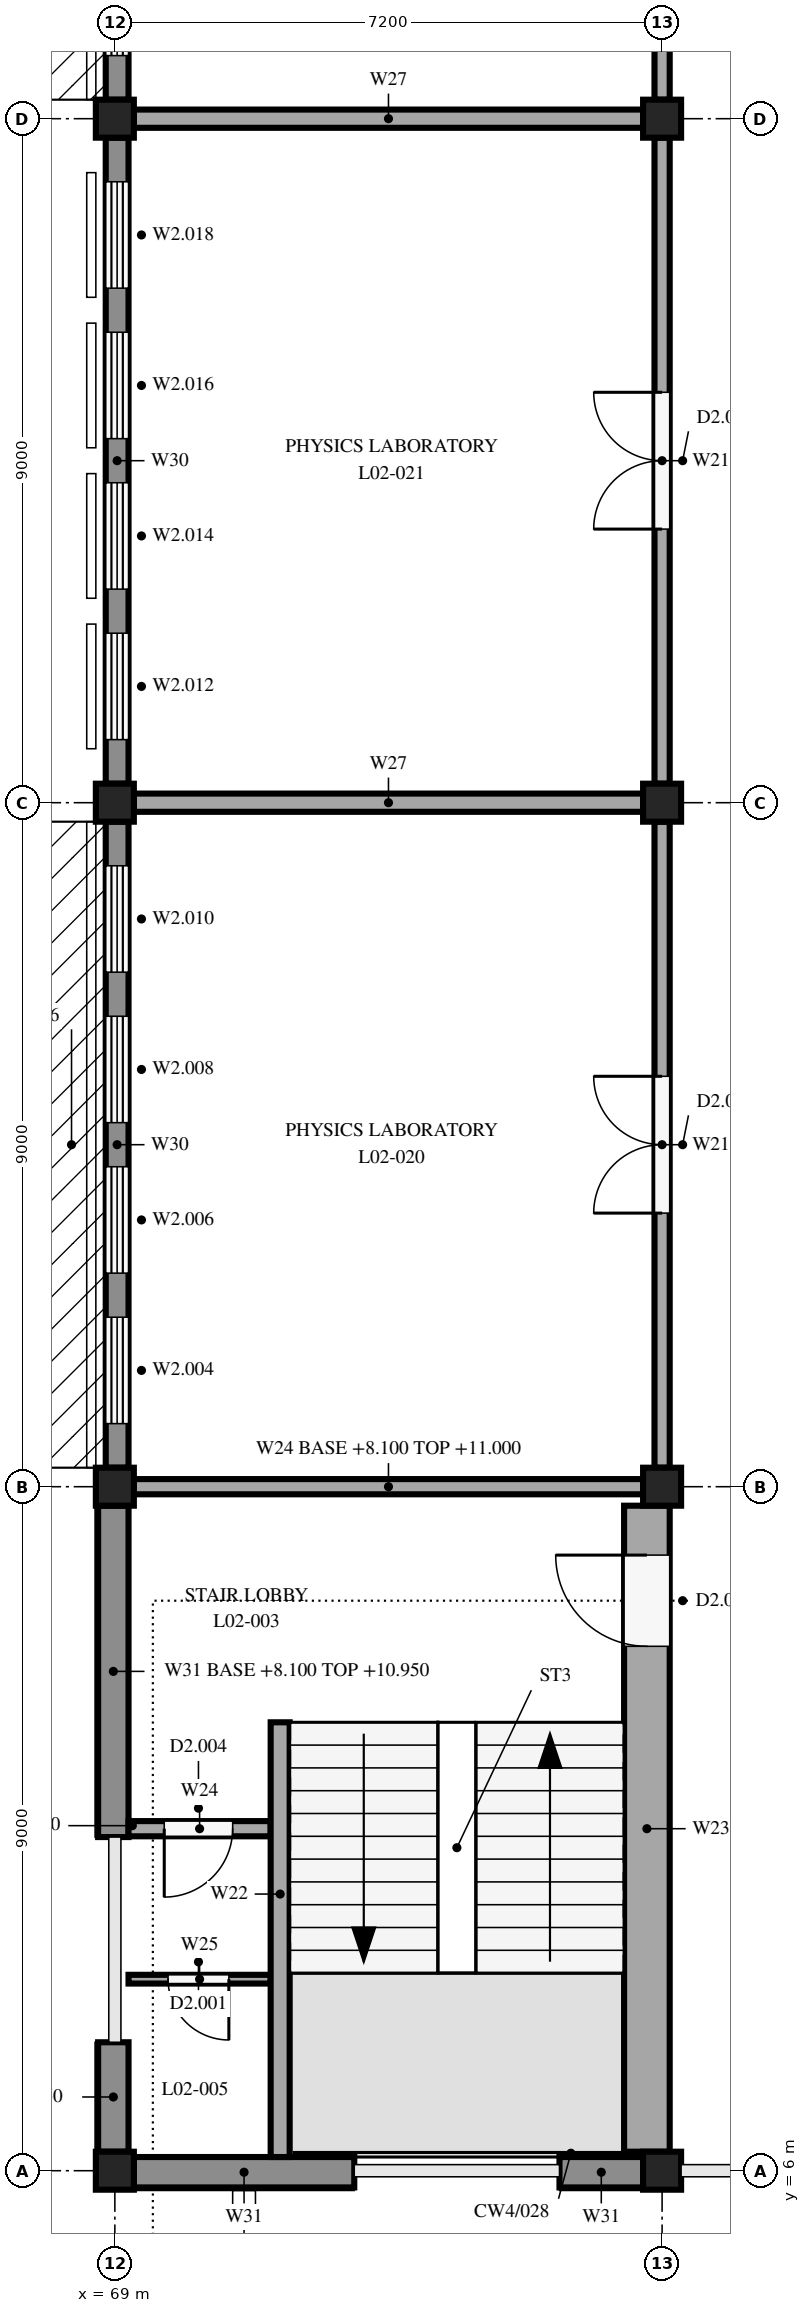
"""IFC4 building model, lengths in metres.
Left out: names, types, materials, properties, quantities, classifications, styles, units other than length and angle.
Written with IfcOpenShell. Run it as: python <this file> out.ifc"""

import sys

from ifc_helpers import new_model, si_unit, direction, frame, frame_2d, origin, origin_2d, place, context, subcontext, project, spatial, rectangle, extrude, element, fill, save


model = new_model("IFC4")
c1 = context("Model", 3, precision=1e-05, world=origin(), true_north=direction((0.0, 1.0)))
c2 = subcontext(c1, "Body", "Model", "MODEL_VIEW")
j1 = project(units=[si_unit("LENGTHUNIT", "METRE"), si_unit("PLANEANGLEUNIT", "RADIAN")], contexts=[c1])
p1 = place(None, origin())
s1 = spatial("IfcSite", under=j1, at=p1, CompositionType="ELEMENT")
p2 = place(p1, origin())
s2 = spatial("IfcBuilding", under=s1, at=p2, CompositionType="ELEMENT")
p3 = place(p2, frame((0.0, 0.0, 8.1)))
s3 = spatial("IfcBuildingStorey", under=s2, at=p3, CompositionType="ELEMENT", Elevation=8.1)
for number, where, z_axis, x_axis in (
    (1, (69.0, 6.0, 0.0), (0.0, 0.0, 1.0), (1.0, 0.0, 0.0)),
    (2, (69.0, 15.0, 0.0), (0.0, 0.0, 1.0), (1.0, 0.0, 0.0)),
    (3, (69.0, 24.0, 0.0), (0.0, 0.0, 1.0), (1.0, 0.0, 0.0)),
    (4, (69.0, 33.0, 0.0), (0.0, 0.0, 1.0), (1.0, 0.0, 0.0)),
    (5, (76.2, 6.0, 0.0), (0.0, 0.0, 1.0), (1.0, 0.0, 0.0)),
    (6, (76.2, 15.0, 0.0), (0.0, 0.0, 1.0), (1.0, 0.0, 0.0)),
    (7, (76.2, 24.0, 0.0), (0.0, 0.0, 1.0), (1.0, 0.0, 0.0)),
    (8, (76.2, 33.0, 0.0), (0.0, 0.0, 1.0), (1.0, 0.0, 0.0)),
):
    element("IfcColumn", number, at=place(p3, frame(where, z_axis=z_axis, x_axis=x_axis)), inside=s3, PredefinedType="COLUMN", context=c2, shape_type="SweptSolid", body=[
        extrude(rectangle(XDim=0.5, YDim=0.5, at=origin_2d()), origin(), (0.0, 0.0, 1.0), 3.35),
    ])
p4 = place(p3, frame((68.98, 6.25, 0.0), z_axis=(0.0, 0.0, 1.0), x_axis=(0.0, 1.0, 0.0)))
e9 = element("IfcWall", 9, at=p4, inside=s3, PredefinedType="STANDARD", context=c2, shape_type="SweptSolid", body=[
    extrude(rectangle(XDim=1.44, YDim=0.4, at=frame_2d((0.72, 0.0))), origin(), (0.0, 0.0, 1.0), 2.85),
])
p5 = place(p3, frame((68.98, 10.39, 0.0), z_axis=(0.0, 0.0, 1.0), x_axis=(0.0, 1.0, 0.0)))
e10 = element("IfcWall", 10, at=p5, inside=s3, PredefinedType="STANDARD", context=c2, shape_type="SweptSolid", body=[
    extrude(rectangle(XDim=4.36, YDim=0.4, at=frame_2d((2.18, 0.0))), origin(), (0.0, 0.0, 1.0), 2.85),
])
p6 = place(p3, frame((69.03, 15.25, 0.0), z_axis=(0.0, 0.0, 1.0), x_axis=(0.0, 1.0, 0.0)))
e11 = element("IfcWall", 11, at=p6, inside=s3, PredefinedType="STANDARD", context=c2, shape_type="SweptSolid", body=[
    extrude(rectangle(XDim=8.5, YDim=0.3, at=frame_2d((4.25, 0.0))), origin(), (0.0, 0.0, 1.0), 2.85),
])
p7 = place(p6, frame((0.58, 0.0, 0.9)))
e12 = element("IfcOpeningElement", 12, at=p7, cuts=e11, PredefinedType="OPENING", context=c2, shape_type="SweptSolid", body=[
    extrude(rectangle(XDim=1.4, YDim=1.9, at=frame_2d((0.7, 0.95))), frame((0.0, 0.16, 0.0), z_axis=(0.0, -1.0, 0.0), x_axis=(1.0, 0.0, 0.0)), (0.0, 0.0, 1.0), 0.32),
])
p8 = place(p6, frame((2.56, 0.0, 0.9)))
e13 = element("IfcOpeningElement", 13, at=p8, cuts=e11, PredefinedType="OPENING", context=c2, shape_type="SweptSolid", body=[
    extrude(rectangle(XDim=1.4, YDim=1.9, at=frame_2d((0.7, 0.95))), frame((0.0, 0.16, 0.0), z_axis=(0.0, -1.0, 0.0), x_axis=(1.0, 0.0, 0.0)), (0.0, 0.0, 1.0), 0.32),
])
p9 = place(p6, frame((4.54, 0.0, 0.9)))
e14 = element("IfcOpeningElement", 14, at=p9, cuts=e11, PredefinedType="OPENING", context=c2, shape_type="SweptSolid", body=[
    extrude(rectangle(XDim=1.4, YDim=1.9, at=frame_2d((0.7, 0.95))), frame((0.0, 0.16, 0.0), z_axis=(0.0, -1.0, 0.0), x_axis=(1.0, 0.0, 0.0)), (0.0, 0.0, 1.0), 0.32),
])
p10 = place(p6, frame((6.52, 0.0, 0.9)))
e15 = element("IfcOpeningElement", 15, at=p10, cuts=e11, PredefinedType="OPENING", context=c2, shape_type="SweptSolid", body=[
    extrude(rectangle(XDim=1.4, YDim=1.9, at=frame_2d((0.7, 0.95))), frame((0.0, 0.16, 0.0), z_axis=(0.0, -1.0, 0.0), x_axis=(1.0, 0.0, 0.0)), (0.0, 0.0, 1.0), 0.32),
])
p11 = place(p3, frame((69.03, 24.25, 0.0), z_axis=(0.0, 0.0, 1.0), x_axis=(0.0, 1.0, 0.0)))
e16 = element("IfcWall", 16, at=p11, inside=s3, PredefinedType="STANDARD", context=c2, shape_type="SweptSolid", body=[
    extrude(rectangle(XDim=8.5, YDim=0.3, at=frame_2d((4.25, 0.0))), origin(), (0.0, 0.0, 1.0), 2.85),
])
p12 = place(p11, frame((0.58, 0.0, 0.9)))
e17 = element("IfcOpeningElement", 17, at=p12, cuts=e16, PredefinedType="OPENING", context=c2, shape_type="SweptSolid", body=[
    extrude(rectangle(XDim=1.4, YDim=1.9, at=frame_2d((0.7, 0.95))), frame((0.0, 0.16, 0.0), z_axis=(0.0, -1.0, 0.0), x_axis=(1.0, 0.0, 0.0)), (0.0, 0.0, 1.0), 0.32),
])
p13 = place(p11, frame((2.56, 0.0, 0.9)))
e18 = element("IfcOpeningElement", 18, at=p13, cuts=e16, PredefinedType="OPENING", context=c2, shape_type="SweptSolid", body=[
    extrude(rectangle(XDim=1.4, YDim=1.9, at=frame_2d((0.7, 0.95))), frame((0.0, 0.16, 0.0), z_axis=(0.0, -1.0, 0.0), x_axis=(1.0, 0.0, 0.0)), (0.0, 0.0, 1.0), 0.32),
])
p14 = place(p11, frame((4.54, 0.0, 0.9)))
e19 = element("IfcOpeningElement", 19, at=p14, cuts=e16, PredefinedType="OPENING", context=c2, shape_type="SweptSolid", body=[
    extrude(rectangle(XDim=1.4, YDim=1.9, at=frame_2d((0.7, 0.95))), frame((0.0, 0.16, 0.0), z_axis=(0.0, -1.0, 0.0), x_axis=(1.0, 0.0, 0.0)), (0.0, 0.0, 1.0), 0.32),
])
p15 = place(p11, frame((6.52, 0.0, 0.9)))
e20 = element("IfcOpeningElement", 20, at=p15, cuts=e16, PredefinedType="OPENING", context=c2, shape_type="SweptSolid", body=[
    extrude(rectangle(XDim=1.4, YDim=1.9, at=frame_2d((0.7, 0.95))), frame((0.0, 0.16, 0.0), z_axis=(0.0, -1.0, 0.0), x_axis=(1.0, 0.0, 0.0)), (0.0, 0.0, 1.0), 0.32),
])
p16 = place(p3, frame((69.03, 33.25, 0.0), z_axis=(0.0, 0.0, 1.0), x_axis=(0.0, 1.0, 0.0)))
e21 = element("IfcWall", 21, at=p16, inside=s3, PredefinedType="STANDARD", context=c2, shape_type="SweptSolid", body=[
    extrude(rectangle(XDim=8.5, YDim=0.3, at=frame_2d((4.25, 0.0))), origin(), (0.0, 0.0, 1.0), 2.85),
])
p17 = place(p16, frame((0.58, 0.0, 0.9)))
e22 = element("IfcOpeningElement", 22, at=p17, cuts=e21, PredefinedType="OPENING", context=c2, shape_type="SweptSolid", body=[
    extrude(rectangle(XDim=1.4, YDim=1.9, at=frame_2d((0.7, 0.95))), frame((0.0, 0.16, 0.0), z_axis=(0.0, -1.0, 0.0), x_axis=(1.0, 0.0, 0.0)), (0.0, 0.0, 1.0), 0.32),
])
p18 = place(p16, frame((2.56, 0.0, 0.9)))
e23 = element("IfcOpeningElement", 23, at=p18, cuts=e21, PredefinedType="OPENING", context=c2, shape_type="SweptSolid", body=[
    extrude(rectangle(XDim=1.4, YDim=1.9, at=frame_2d((0.7, 0.95))), frame((0.0, 0.16, 0.0), z_axis=(0.0, -1.0, 0.0), x_axis=(1.0, 0.0, 0.0)), (0.0, 0.0, 1.0), 0.32),
])
p19 = place(p16, frame((4.54, 0.0, 0.9)))
e24 = element("IfcOpeningElement", 24, at=p19, cuts=e21, PredefinedType="OPENING", context=c2, shape_type="SweptSolid", body=[
    extrude(rectangle(XDim=1.4, YDim=1.9, at=frame_2d((0.7, 0.95))), frame((0.0, 0.16, 0.0), z_axis=(0.0, -1.0, 0.0), x_axis=(1.0, 0.0, 0.0)), (0.0, 0.0, 1.0), 0.32),
])
p20 = place(p16, frame((6.52, 0.0, 0.9)))
e25 = element("IfcOpeningElement", 25, at=p20, cuts=e21, PredefinedType="OPENING", context=c2, shape_type="SweptSolid", body=[
    extrude(rectangle(XDim=1.4, YDim=1.9, at=frame_2d((0.7, 0.95))), frame((0.0, 0.16, 0.0), z_axis=(0.0, -1.0, 0.0), x_axis=(1.0, 0.0, 0.0)), (0.0, 0.0, 1.0), 0.32),
])
p21 = place(p3, frame((72.15, 5.98, 0.0), z_axis=(0.0, 0.0, 1.0), x_axis=(-1.0, 0.0, 0.0)))
e26 = element("IfcWall", 26, at=p21, inside=s3, PredefinedType="STANDARD", context=c2, shape_type="SweptSolid", body=[
    extrude(rectangle(XDim=2.9, YDim=0.4, at=frame_2d((1.45, 0.0))), origin(), (0.0, 0.0, 1.0), 2.9),
])
p22 = place(p3, frame((75.95, 5.98, 0.0), z_axis=(0.0, 0.0, 1.0), x_axis=(-1.0, 0.0, 0.0)))
e27 = element("IfcWall", 27, at=p22, inside=s3, PredefinedType="STANDARD", context=c2, shape_type="SweptSolid", body=[
    extrude(rectangle(XDim=1.1, YDim=0.4, at=frame_2d((0.55, 0.0))), origin(), (0.0, 0.0, 1.0), 2.9),
])
p23 = place(p3, frame((71.175, 6.18, 0.0), z_axis=(0.0, 0.0, 1.0), x_axis=(0.0, 1.0, 0.0)))
e28 = element("IfcWall", 28, at=p23, inside=s3, PredefinedType="SOLIDWALL", context=c2, shape_type="SweptSolid", body=[
    extrude(rectangle(XDim=5.72, YDim=0.25, at=frame_2d((2.86, 0.0))), origin(), (0.0, 0.0, 1.0), 3.35),
])
p24 = place(p3, frame((76.0, 6.25, 0.0), z_axis=(0.0, 0.0, 1.0), x_axis=(0.0, 1.0, 0.0)))
e29 = element("IfcWall", 29, at=p24, inside=s3, PredefinedType="SOLIDWALL", context=c2, shape_type="SweptSolid", body=[
    extrude(rectangle(XDim=8.5, YDim=0.6, at=frame_2d((4.25, 0.0))), origin(), (0.0, 0.0, 1.0), 3.35),
])
p25 = place(p24, frame((6.65, 0.0, 0.0)))
e30 = element("IfcOpeningElement", 30, at=p25, cuts=e29, PredefinedType="OPENING", context=c2, shape_type="SweptSolid", body=[
    extrude(rectangle(XDim=1.2, YDim=2.1, at=frame_2d((0.6, 1.05))), frame((0.0, 0.31, 0.0), z_axis=(0.0, -1.0, 0.0), x_axis=(1.0, 0.0, 0.0)), (0.0, 0.0, 1.0), 0.62),
])
p26 = place(p3, frame((71.05, 10.5, 0.0), z_axis=(0.0, 0.0, 1.0), x_axis=(-1.0, 0.0, 0.0)))
e31 = element("IfcWall", 31, at=p26, inside=s3, PredefinedType="SOLIDWALL", context=c2, shape_type="SweptSolid", body=[
    extrude(rectangle(XDim=1.87, YDim=0.2, at=frame_2d((0.935, 0.0))), origin(), (0.0, 0.0, 1.0), 3.35),
])
p27 = place(p26, frame((0.5, 0.0, 0.0)))
e32 = element("IfcOpeningElement", 32, at=p27, cuts=e31, PredefinedType="OPENING", context=c2, shape_type="SweptSolid", body=[
    extrude(rectangle(XDim=0.9, YDim=2.1, at=frame_2d((0.45, 1.05))), frame((0.0, 0.11, 0.0), z_axis=(0.0, -1.0, 0.0), x_axis=(1.0, 0.0, 0.0)), (0.0, 0.0, 1.0), 0.22),
])
p28 = place(p3, frame((71.05, 8.52, 0.0), z_axis=(0.0, 0.0, 1.0), x_axis=(-1.0, 0.0, 0.0)))
e33 = element("IfcWall", 33, at=p28, inside=s3, PredefinedType="PARTITIONING", context=c2, shape_type="SweptSolid", body=[
    extrude(rectangle(XDim=1.87, YDim=0.115, at=frame_2d((0.935, 0.0))), origin(), (0.0, 0.0, 1.0), 3.35),
])
p29 = place(p28, frame((0.55, 0.0, 0.0)))
e34 = element("IfcOpeningElement", 34, at=p29, cuts=e33, PredefinedType="OPENING", context=c2, shape_type="SweptSolid", body=[
    extrude(rectangle(XDim=0.8, YDim=2.1, at=frame_2d((0.4, 1.05))), frame((0.0, 0.067, 0.0), z_axis=(0.0, -1.0, 0.0), x_axis=(1.0, 0.0, 0.0)), (0.0, 0.0, 1.0), 0.135),
])
p30 = place(p3, frame((69.25, 15.0, 0.0), z_axis=(0.0, 0.0, 1.0), x_axis=(1.0, 0.0, 0.0)))
e35 = element("IfcWall", 35, at=p30, inside=s3, PredefinedType="SOLIDWALL", context=c2, shape_type="SweptSolid", body=[
    extrude(rectangle(XDim=6.7, YDim=0.2, at=frame_2d((3.35, 0.0))), origin(), (0.0, 0.0, 1.0), 2.9),
])
p31 = place(p3, frame((76.2, 15.25, 0.0), z_axis=(0.0, 0.0, 1.0), x_axis=(0.0, 1.0, 0.0)))
e36 = element("IfcWall", 36, at=p31, inside=s3, PredefinedType="PARTITIONING", context=c2, shape_type="SweptSolid", body=[
    extrude(rectangle(XDim=8.5, YDim=0.2, at=frame_2d((4.25, 0.0))), origin(), (0.0, 0.0, 1.0), 2.9),
])
p32 = place(p31, frame((3.35, 0.0, 0.0)))
e37 = element("IfcOpeningElement", 37, at=p32, cuts=e36, PredefinedType="OPENING", context=c2, shape_type="SweptSolid", body=[
    extrude(rectangle(XDim=1.8, YDim=2.1, at=frame_2d((0.9, 1.05))), frame((0.0, 0.11, 0.0), z_axis=(0.0, -1.0, 0.0), x_axis=(1.0, 0.0, 0.0)), (0.0, 0.0, 1.0), 0.22),
])
p33 = place(p3, frame((76.2, 24.25, 0.0), z_axis=(0.0, 0.0, 1.0), x_axis=(0.0, 1.0, 0.0)))
e38 = element("IfcWall", 38, at=p33, inside=s3, PredefinedType="PARTITIONING", context=c2, shape_type="SweptSolid", body=[
    extrude(rectangle(XDim=8.5, YDim=0.2, at=frame_2d((4.25, 0.0))), origin(), (0.0, 0.0, 1.0), 2.9),
])
p34 = place(p33, frame((3.35, 0.0, 0.0)))
e39 = element("IfcOpeningElement", 39, at=p34, cuts=e38, PredefinedType="OPENING", context=c2, shape_type="SweptSolid", body=[
    extrude(rectangle(XDim=1.8, YDim=2.1, at=frame_2d((0.9, 1.05))), frame((0.0, 0.11, 0.0), z_axis=(0.0, -1.0, 0.0), x_axis=(1.0, 0.0, 0.0)), (0.0, 0.0, 1.0), 0.22),
])
p35 = place(p3, frame((76.2, 33.25, 0.0), z_axis=(0.0, 0.0, 1.0), x_axis=(0.0, 1.0, 0.0)))
e40 = element("IfcWall", 40, at=p35, inside=s3, PredefinedType="PARTITIONING", context=c2, shape_type="SweptSolid", body=[
    extrude(rectangle(XDim=8.5, YDim=0.2, at=frame_2d((4.25, 0.0))), origin(), (0.0, 0.0, 1.0), 2.9),
])
p36 = place(p35, frame((1.615, 0.0, 0.0)))
e41 = element("IfcOpeningElement", 41, at=p36, cuts=e40, PredefinedType="OPENING", context=c2, shape_type="SweptSolid", body=[
    extrude(rectangle(XDim=0.9, YDim=2.1, at=frame_2d((0.45, 1.05))), frame((0.0, 0.11, 0.0), z_axis=(0.0, -1.0, 0.0), x_axis=(1.0, 0.0, 0.0)), (0.0, 0.0, 1.0), 0.22),
])
p37 = place(p35, frame((5.535, 0.0, 0.0)))
e42 = element("IfcOpeningElement", 42, at=p37, cuts=e40, PredefinedType="OPENING", context=c2, shape_type="SweptSolid", body=[
    extrude(rectangle(XDim=1.8, YDim=2.1, at=frame_2d((0.9, 1.05))), frame((0.0, 0.11, 0.0), z_axis=(0.0, -1.0, 0.0), x_axis=(1.0, 0.0, 0.0)), (0.0, 0.0, 1.0), 0.22),
])
for number, where, z_axis, x_axis in (
    (43, (69.25, 24.0, 0.0), (0.0, 0.0, 1.0), (1.0, 0.0, 0.0)),
    (44, (69.25, 33.0, 0.0), (0.0, 0.0, 1.0), (1.0, 0.0, 0.0)),
):
    element("IfcWall", number, at=place(p3, frame(where, z_axis=z_axis, x_axis=x_axis)), inside=s3, PredefinedType="PARTITIONING", context=c2, shape_type="SweptSolid", body=[
        extrude(rectangle(XDim=6.7, YDim=0.24, at=frame_2d((3.35, 0.0))), origin(), (0.0, 0.0, 1.0), 2.9),
    ])
p38 = place(p7, origin())
e45 = element("IfcWindow", 45, at=p38, inside=s3, PartitioningType="DOUBLE_PANEL_VERTICAL", PredefinedType="WINDOW", context=c2, shape_type="SweptSolid", body=[
    extrude(rectangle(XDim=1.4, YDim=1.9, at=frame_2d((0.7, 0.95))), frame((0.0, 0.03, 0.0), z_axis=(0.0, -1.0, 0.0), x_axis=(1.0, 0.0, 0.0)), (0.0, 0.0, 1.0), 0.06),
])
fill(e12, e45)
p39 = place(p8, origin())
e46 = element("IfcWindow", 46, at=p39, inside=s3, PartitioningType="DOUBLE_PANEL_VERTICAL", PredefinedType="WINDOW", context=c2, shape_type="SweptSolid", body=[
    extrude(rectangle(XDim=1.4, YDim=1.9, at=frame_2d((0.7, 0.95))), frame((0.0, 0.03, 0.0), z_axis=(0.0, -1.0, 0.0), x_axis=(1.0, 0.0, 0.0)), (0.0, 0.0, 1.0), 0.06),
])
fill(e13, e46)
p40 = place(p9, origin())
e47 = element("IfcWindow", 47, at=p40, inside=s3, PartitioningType="DOUBLE_PANEL_VERTICAL", PredefinedType="WINDOW", context=c2, shape_type="SweptSolid", body=[
    extrude(rectangle(XDim=1.4, YDim=1.9, at=frame_2d((0.7, 0.95))), frame((0.0, 0.03, 0.0), z_axis=(0.0, -1.0, 0.0), x_axis=(1.0, 0.0, 0.0)), (0.0, 0.0, 1.0), 0.06),
])
fill(e14, e47)
p41 = place(p10, origin())
e48 = element("IfcWindow", 48, at=p41, inside=s3, PartitioningType="DOUBLE_PANEL_VERTICAL", PredefinedType="WINDOW", context=c2, shape_type="SweptSolid", body=[
    extrude(rectangle(XDim=1.4, YDim=1.9, at=frame_2d((0.7, 0.95))), frame((0.0, 0.03, 0.0), z_axis=(0.0, -1.0, 0.0), x_axis=(1.0, 0.0, 0.0)), (0.0, 0.0, 1.0), 0.06),
])
fill(e15, e48)
p42 = place(p12, origin())
e49 = element("IfcWindow", 49, at=p42, inside=s3, PartitioningType="DOUBLE_PANEL_VERTICAL", PredefinedType="WINDOW", context=c2, shape_type="SweptSolid", body=[
    extrude(rectangle(XDim=1.4, YDim=1.9, at=frame_2d((0.7, 0.95))), frame((0.0, 0.03, 0.0), z_axis=(0.0, -1.0, 0.0), x_axis=(1.0, 0.0, 0.0)), (0.0, 0.0, 1.0), 0.06),
])
fill(e17, e49)
p43 = place(p13, origin())
e50 = element("IfcWindow", 50, at=p43, inside=s3, PartitioningType="DOUBLE_PANEL_VERTICAL", PredefinedType="WINDOW", context=c2, shape_type="SweptSolid", body=[
    extrude(rectangle(XDim=1.4, YDim=1.9, at=frame_2d((0.7, 0.95))), frame((0.0, 0.03, 0.0), z_axis=(0.0, -1.0, 0.0), x_axis=(1.0, 0.0, 0.0)), (0.0, 0.0, 1.0), 0.06),
])
fill(e18, e50)
p44 = place(p14, origin())
e51 = element("IfcWindow", 51, at=p44, inside=s3, PartitioningType="DOUBLE_PANEL_VERTICAL", PredefinedType="WINDOW", context=c2, shape_type="SweptSolid", body=[
    extrude(rectangle(XDim=1.4, YDim=1.9, at=frame_2d((0.7, 0.95))), frame((0.0, 0.03, 0.0), z_axis=(0.0, -1.0, 0.0), x_axis=(1.0, 0.0, 0.0)), (0.0, 0.0, 1.0), 0.06),
])
fill(e19, e51)
p45 = place(p15, origin())
e52 = element("IfcWindow", 52, at=p45, inside=s3, PartitioningType="DOUBLE_PANEL_VERTICAL", PredefinedType="WINDOW", context=c2, shape_type="SweptSolid", body=[
    extrude(rectangle(XDim=1.4, YDim=1.9, at=frame_2d((0.7, 0.95))), frame((0.0, 0.03, 0.0), z_axis=(0.0, -1.0, 0.0), x_axis=(1.0, 0.0, 0.0)), (0.0, 0.0, 1.0), 0.06),
])
fill(e20, e52)
p46 = place(p17, origin())
e53 = element("IfcWindow", 53, at=p46, inside=s3, PartitioningType="DOUBLE_PANEL_VERTICAL", PredefinedType="WINDOW", context=c2, shape_type="SweptSolid", body=[
    extrude(rectangle(XDim=1.4, YDim=1.9, at=frame_2d((0.7, 0.95))), frame((0.0, 0.03, 0.0), z_axis=(0.0, -1.0, 0.0), x_axis=(1.0, 0.0, 0.0)), (0.0, 0.0, 1.0), 0.06),
])
fill(e22, e53)
p47 = place(p25, origin())
e54 = element("IfcDoor", 54, at=p47, inside=s3, OperationType="SINGLE_SWING_RIGHT", PredefinedType="DOOR", context=c2, shape_type="SweptSolid", body=[
    extrude(rectangle(XDim=1.2, YDim=2.1, at=frame_2d((0.6, 1.05))), frame((0.0, 0.025, 0.0), z_axis=(0.0, -1.0, 0.0), x_axis=(1.0, 0.0, 0.0)), (0.0, 0.0, 1.0), 0.05),
])
fill(e30, e54)
p48 = place(p27, origin())
e55 = element("IfcDoor", 55, at=p48, inside=s3, OperationType="SINGLE_SWING_RIGHT", PredefinedType="DOOR", context=c2, shape_type="SweptSolid", body=[
    extrude(rectangle(XDim=0.9, YDim=2.1, at=frame_2d((0.45, 1.05))), frame((0.0, 0.025, 0.0), z_axis=(0.0, -1.0, 0.0), x_axis=(1.0, 0.0, 0.0)), (0.0, 0.0, 1.0), 0.05),
])
fill(e32, e55)
p49 = place(p29, origin())
e56 = element("IfcDoor", 56, at=p49, inside=s3, OperationType="SINGLE_SWING_LEFT", PredefinedType="DOOR", context=c2, shape_type="SweptSolid", body=[
    extrude(rectangle(XDim=0.8, YDim=2.1, at=frame_2d((0.4, 1.05))), frame((0.0, 0.025, 0.0), z_axis=(0.0, -1.0, 0.0), x_axis=(1.0, 0.0, 0.0)), (0.0, 0.0, 1.0), 0.05),
])
fill(e34, e56)
p50 = place(p32, origin())
e57 = element("IfcDoor", 57, at=p50, inside=s3, OperationType="DOUBLE_DOOR_DOUBLE_SWING", PredefinedType="DOOR", context=c2, shape_type="SweptSolid", body=[
    extrude(rectangle(XDim=1.8, YDim=2.1, at=frame_2d((0.9, 1.05))), frame((0.0, 0.025, 0.0), z_axis=(0.0, -1.0, 0.0), x_axis=(1.0, 0.0, 0.0)), (0.0, 0.0, 1.0), 0.05),
])
fill(e37, e57)
p51 = place(p34, origin())
e58 = element("IfcDoor", 58, at=p51, inside=s3, OperationType="DOUBLE_DOOR_DOUBLE_SWING", PredefinedType="DOOR", context=c2, shape_type="SweptSolid", body=[
    extrude(rectangle(XDim=1.8, YDim=2.1, at=frame_2d((0.9, 1.05))), frame((0.0, 0.025, 0.0), z_axis=(0.0, -1.0, 0.0), x_axis=(1.0, 0.0, 0.0)), (0.0, 0.0, 1.0), 0.05),
])
fill(e39, e58)
save(model, sys.argv[1])
